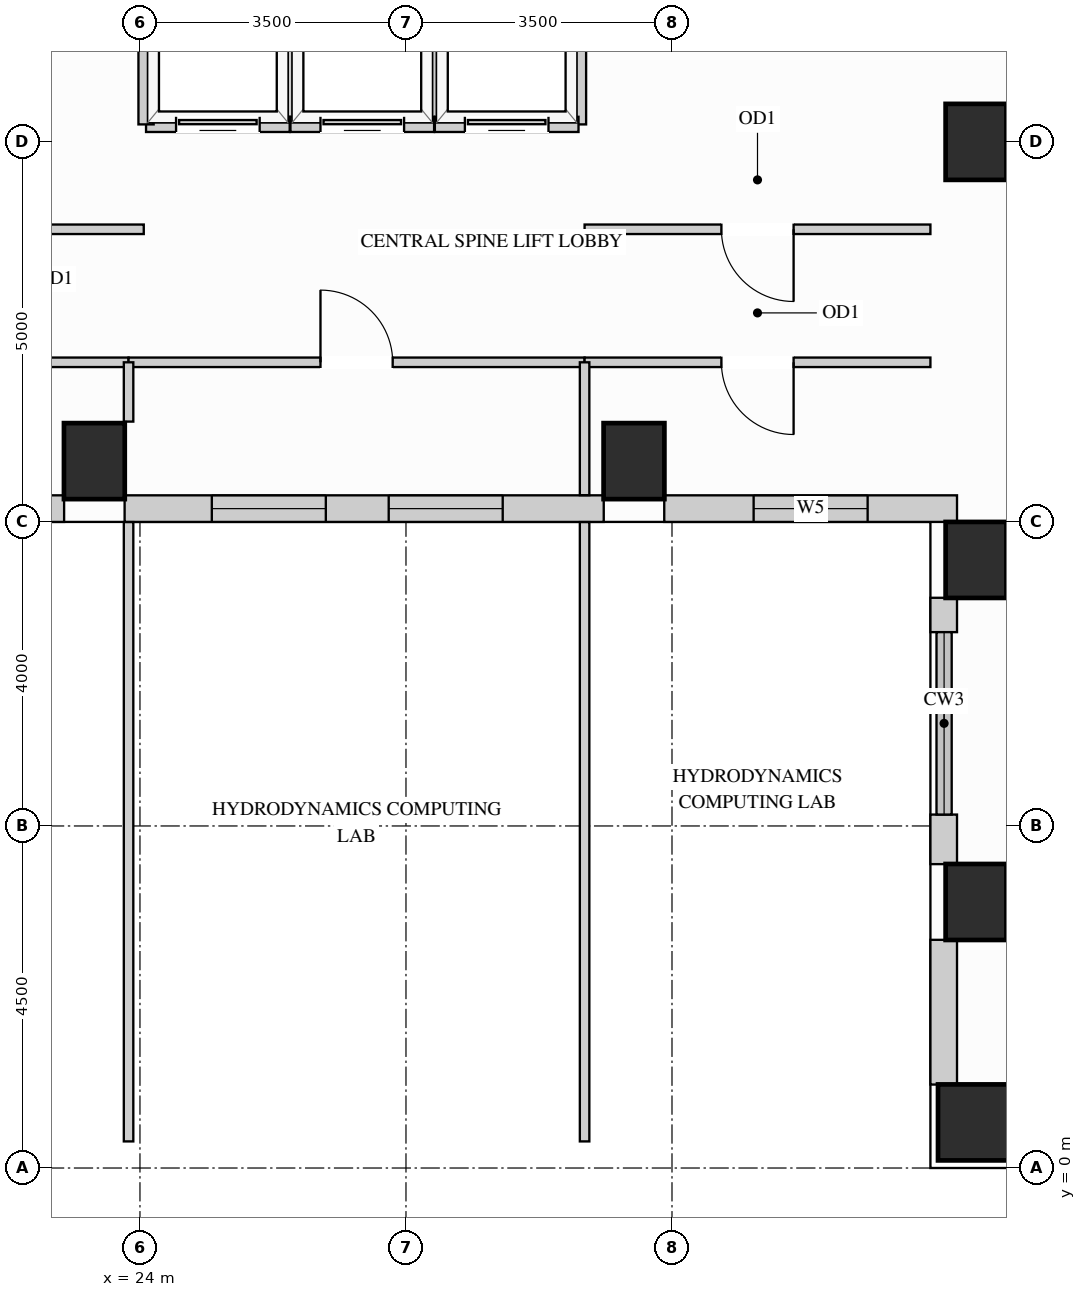
"""IFC4 building model, lengths in metres.
Left out: names, types, materials, properties, quantities, classifications, styles, units other than length and angle.
Written with IfcOpenShell. Run it as: python <this file> out.ifc"""

import sys

from ifc_helpers import new_model, si_unit, direction, frame, frame_2d, origin, origin_2d, place, context, subcontext, project, spatial, rectangle, extrude, source, transform, mapped, element, fill, save


model = new_model("IFC4")
c1 = context("Model", 3, precision=1e-05, world=origin(), true_north=direction((0.0, 1.0)))
c2 = subcontext(c1, "Body", "Model", "MODEL_VIEW")
j1 = project(units=[si_unit("LENGTHUNIT", "METRE"), si_unit("PLANEANGLEUNIT", "RADIAN")], contexts=[c1])
p1 = place(None, origin())
s1 = spatial("IfcSite", under=j1, at=p1, CompositionType="ELEMENT")
p2 = place(p1, origin())
s2 = spatial("IfcBuilding", under=s1, at=p2, CompositionType="ELEMENT")
p3 = place(p2, frame((0.0, 0.0, 161.1)))
s3 = spatial("IfcBuildingStorey", under=s2, at=p3, CompositionType="ELEMENT", Elevation=161.1)
m1 = source(origin(), c2, "Body", "SweptSolid", [
    extrude(rectangle(XDim=0.8, YDim=1.0, at=origin_2d()), origin(), (0.0, 0.0, 1.0), 3.4),
])
for number, where, z_axis, x_axis in (
    (1, (35.0, 13.5, 0.0), (0.0, 0.0, 1.0), (1.0, 0.0, 0.0)),
    (2, (35.0, 3.5, 0.0), (0.0, 0.0, 1.0), (1.0, 0.0, 0.0)),
    (3, (35.0, 8.0, 0.0), (0.0, 0.0, 1.0), (1.0, 0.0, 0.0)),
    (4, (23.4, 9.3, 0.0), (0.0, 0.0, 1.0), (1.0, 0.0, 0.0)),
    (5, (30.5, 9.3, 0.0), (0.0, 0.0, 1.0), (1.0, 0.0, 0.0)),
):
    element("IfcColumn", number, at=place(p3, frame(where, z_axis=z_axis, x_axis=x_axis)), inside=s3, PredefinedType="COLUMN", context=c2, shape_type="MappedRepresentation", body=[
        mapped(m1, transform((0.0, 0.0, 0.0), x_axis=(1.0, 0.0, 0.0), y_axis=(0.0, 1.0, 0.0), z_axis=(0.0, 0.0, 1.0))),
    ])
m2 = source(origin(), c2, "Body", "SweptSolid", [
    extrude(rectangle(XDim=1.0, YDim=1.0, at=origin_2d()), origin(), (0.0, 0.0, 1.0), 3.4),
])
p4 = place(p3, frame((35.0, 0.6, 0.0), z_axis=(0.0, 0.0, 1.0), x_axis=(1.0, 0.0, 0.0)))
e6 = element("IfcColumn", 6, at=p4, inside=s3, PredefinedType="COLUMN", context=c2, shape_type="MappedRepresentation", body=[
    mapped(m2, transform((0.0, 0.0, 0.0), x_axis=(1.0, 0.0, 0.0), y_axis=(0.0, 1.0, 0.0), z_axis=(0.0, 0.0, 1.0))),
])
p5 = place(p3, frame((19.398, 8.675, 0.0), z_axis=(0.0, 0.0, 1.0), x_axis=(1.0, 0.0, 0.0)))
e7 = element("IfcWall", 7, at=p5, inside=s3, PredefinedType="SOLIDWALL", context=c2, shape_type="SweptSolid", body=[
    extrude(rectangle(XDim=3.604, YDim=0.35, at=frame_2d((1.802, 0.0))), origin(), (0.0, 0.0, 1.0), 3.385),
])
p6 = place(p5, frame((1.067, 0.0, 0.78)))
e8 = element("IfcOpeningElement", 8, at=p6, cuts=e7, PredefinedType="OPENING", context=c2, shape_type="SweptSolid", body=[
    extrude(rectangle(XDim=1.5, YDim=2.0, at=frame_2d((0.75, 1.0))), frame((0.0, 0.185, 0.0), z_axis=(0.0, -1.0, 0.0), x_axis=(1.0, 0.0, 0.0)), (0.0, 0.0, 1.0), 0.37),
])
p7 = place(p3, frame((23.798, 8.675, 0.0), z_axis=(0.0, 0.0, 1.0), x_axis=(1.0, 0.0, 0.0)))
e9 = element("IfcWall", 9, at=p7, inside=s3, PredefinedType="SOLIDWALL", context=c2, shape_type="SweptSolid", body=[
    extrude(rectangle(XDim=6.304, YDim=0.35, at=frame_2d((3.152, 0.0))), origin(), (0.0, 0.0, 1.0), 3.385),
])
p8 = place(p7, frame((1.147, 0.0, 0.78)))
e10 = element("IfcOpeningElement", 10, at=p8, cuts=e9, PredefinedType="OPENING", context=c2, shape_type="SweptSolid", body=[
    extrude(rectangle(XDim=1.5, YDim=2.0, at=frame_2d((0.75, 1.0))), frame((0.0, 0.185, 0.0), z_axis=(0.0, -1.0, 0.0), x_axis=(1.0, 0.0, 0.0)), (0.0, 0.0, 1.0), 0.37),
])
p9 = place(p7, frame((3.475, 0.0, 0.78)))
e11 = element("IfcOpeningElement", 11, at=p9, cuts=e9, PredefinedType="OPENING", context=c2, shape_type="SweptSolid", body=[
    extrude(rectangle(XDim=1.5, YDim=2.0, at=frame_2d((0.75, 1.0))), frame((0.0, 0.185, 0.0), z_axis=(0.0, -1.0, 0.0), x_axis=(1.0, 0.0, 0.0)), (0.0, 0.0, 1.0), 0.37),
])
p10 = place(p3, frame((30.898, 8.675, 0.0), z_axis=(0.0, 0.0, 1.0), x_axis=(1.0, 0.0, 0.0)))
e12 = element("IfcWall", 12, at=p10, inside=s3, PredefinedType="SOLIDWALL", context=c2, shape_type="SweptSolid", body=[
    extrude(rectangle(XDim=3.852, YDim=0.35, at=frame_2d((1.926, 0.0))), origin(), (0.0, 0.0, 1.0), 3.385),
])
p11 = place(p10, frame((1.176, 0.0, 0.78)))
e13 = element("IfcOpeningElement", 13, at=p11, cuts=e12, PredefinedType="OPENING", context=c2, shape_type="SweptSolid", body=[
    extrude(rectangle(XDim=1.5, YDim=2.0, at=frame_2d((0.75, 1.0))), frame((0.0, 0.185, 0.0), z_axis=(0.0, -1.0, 0.0), x_axis=(1.0, 0.0, 0.0)), (0.0, 0.0, 1.0), 0.37),
])
m3 = source(origin(), c2, "Body", "SweptSolid", [
    extrude(rectangle(XDim=0.452, YDim=0.35, at=frame_2d((0.226, 0.0))), origin(), (0.0, 0.0, 1.0), 2.612),
])
p12 = place(p3, frame((34.575, 7.502, 0.0), z_axis=(0.0, 0.0, 1.0), x_axis=(0.0, -1.0, 0.0)))
e14 = element("IfcWall", 14, at=p12, inside=s3, PredefinedType="SOLIDWALL", context=c2, shape_type="MappedRepresentation", body=[
    mapped(m3, transform((0.0, 0.0, 0.0), x_axis=(1.0, 0.0, 0.0), y_axis=(0.0, 1.0, 0.0), z_axis=(0.0, 0.0, 1.0))),
])
m4 = source(origin(), c2, "Body", "SweptSolid", [
    extrude(rectangle(XDim=0.652, YDim=0.35, at=frame_2d((0.326, 0.0))), origin(), (0.0, 0.0, 1.0), 2.612),
])
p13 = place(p3, frame((34.575, 4.65, 0.0), z_axis=(0.0, 0.0, 1.0), x_axis=(0.0, -1.0, 0.0)))
e15 = element("IfcWall", 15, at=p13, inside=s3, PredefinedType="SOLIDWALL", context=c2, shape_type="MappedRepresentation", body=[
    mapped(m4, transform((0.0, 0.0, 0.0), x_axis=(1.0, 0.0, 0.0), y_axis=(0.0, 1.0, 0.0), z_axis=(0.0, 0.0, 1.0))),
])
m5 = source(origin(), c2, "Body", "SweptSolid", [
    extrude(rectangle(XDim=1.904, YDim=0.35, at=frame_2d((0.952, 0.0))), origin(), (0.0, 0.0, 1.0), 2.612),
])
p14 = place(p3, frame((34.575, 3.002, 0.0), z_axis=(0.0, 0.0, 1.0), x_axis=(0.0, -1.0, 0.0)))
e16 = element("IfcWall", 16, at=p14, inside=s3, PredefinedType="SOLIDWALL", context=c2, shape_type="MappedRepresentation", body=[
    mapped(m5, transform((0.0, 0.0, 0.0), x_axis=(1.0, 0.0, 0.0), y_axis=(0.0, 1.0, 0.0), z_axis=(0.0, 0.0, 1.0))),
])
p15 = place(p3, frame((29.85, 12.35, 0.0), z_axis=(0.0, 0.0, 1.0), x_axis=(1.0, 0.0, 0.0)))
e17 = element("IfcWall", 17, at=p15, inside=s3, PredefinedType="PARTITIONING", context=c2, shape_type="SweptSolid", body=[
    extrude(rectangle(XDim=4.55, YDim=0.125, at=frame_2d((2.275, 0.0))), origin(), (0.0, 0.0, 1.0), 3.385),
])
p16 = place(p15, frame((1.8, 0.0, 0.0)))
e18 = element("IfcOpeningElement", 18, at=p16, cuts=e17, PredefinedType="OPENING", context=c2, shape_type="SweptSolid", body=[
    extrude(rectangle(XDim=0.95, YDim=2.15, at=frame_2d((0.475, 1.075))), frame((0.0, 0.073, 0.0), z_axis=(0.0, -1.0, 0.0), x_axis=(1.0, 0.0, 0.0)), (0.0, 0.0, 1.0), 0.145),
])
p17 = place(p3, frame((19.5, 12.35, 0.0), z_axis=(0.0, 0.0, 1.0), x_axis=(1.0, 0.0, 0.0)))
e19 = element("IfcWall", 19, at=p17, inside=s3, PredefinedType="PARTITIONING", context=c2, shape_type="SweptSolid", body=[
    extrude(rectangle(XDim=4.55, YDim=0.125, at=frame_2d((2.275, 0.0))), origin(), (0.0, 0.0, 1.0), 3.385),
])
p18 = place(p17, frame((1.8, 0.0, 0.0)))
e20 = element("IfcOpeningElement", 20, at=p18, cuts=e19, PredefinedType="OPENING", context=c2, shape_type="SweptSolid", body=[
    extrude(rectangle(XDim=0.95, YDim=2.15, at=frame_2d((0.475, 1.075))), frame((0.0, 0.073, 0.0), z_axis=(0.0, -1.0, 0.0), x_axis=(1.0, 0.0, 0.0)), (0.0, 0.0, 1.0), 0.145),
])
p19 = place(p3, frame((19.5, 10.6, 0.0), z_axis=(0.0, 0.0, 1.0), x_axis=(1.0, 0.0, 0.0)))
e21 = element("IfcWall", 21, at=p19, inside=s3, PredefinedType="PARTITIONING", context=c2, shape_type="SweptSolid", body=[
    extrude(rectangle(XDim=4.35, YDim=0.125, at=frame_2d((2.175, 0.0))), origin(), (0.0, 0.0, 1.0), 3.385),
])
p20 = place(p19, frame((1.7, 0.0, 0.0)))
e22 = element("IfcOpeningElement", 22, at=p20, cuts=e21, PredefinedType="OPENING", context=c2, shape_type="SweptSolid", body=[
    extrude(rectangle(XDim=0.95, YDim=2.15, at=frame_2d((0.475, 1.075))), frame((0.0, 0.073, 0.0), z_axis=(0.0, -1.0, 0.0), x_axis=(1.0, 0.0, 0.0)), (0.0, 0.0, 1.0), 0.145),
])
p21 = place(p3, frame((23.85, 10.6, 0.0), z_axis=(0.0, 0.0, 1.0), x_axis=(1.0, 0.0, 0.0)))
e23 = element("IfcWall", 23, at=p21, inside=s3, PredefinedType="PARTITIONING", context=c2, shape_type="SweptSolid", body=[
    extrude(rectangle(XDim=6.0, YDim=0.125, at=frame_2d((3.0, 0.0))), origin(), (0.0, 0.0, 1.0), 3.385),
])
p22 = place(p21, frame((2.525, 0.0, 0.0)))
e24 = element("IfcOpeningElement", 24, at=p22, cuts=e23, PredefinedType="OPENING", context=c2, shape_type="SweptSolid", body=[
    extrude(rectangle(XDim=0.95, YDim=2.15, at=frame_2d((0.475, 1.075))), frame((0.0, 0.073, 0.0), z_axis=(0.0, -1.0, 0.0), x_axis=(1.0, 0.0, 0.0)), (0.0, 0.0, 1.0), 0.145),
])
p23 = place(p3, frame((29.85, 10.6, 0.0), z_axis=(0.0, 0.0, 1.0), x_axis=(1.0, 0.0, 0.0)))
e25 = element("IfcWall", 25, at=p23, inside=s3, PredefinedType="PARTITIONING", context=c2, shape_type="SweptSolid", body=[
    extrude(rectangle(XDim=4.55, YDim=0.125, at=frame_2d((2.275, 0.0))), origin(), (0.0, 0.0, 1.0), 3.385),
])
p24 = place(p23, frame((1.8, 0.0, 0.0)))
e26 = element("IfcOpeningElement", 26, at=p24, cuts=e25, PredefinedType="OPENING", context=c2, shape_type="SweptSolid", body=[
    extrude(rectangle(XDim=0.95, YDim=2.15, at=frame_2d((0.475, 1.075))), frame((0.0, 0.073, 0.0), z_axis=(0.0, -1.0, 0.0), x_axis=(1.0, 0.0, 0.0)), (0.0, 0.0, 1.0), 0.145),
])
m6 = source(origin(), c2, "Body", "SweptSolid", [
    extrude(rectangle(XDim=8.148, YDim=0.125, at=frame_2d((4.074, 0.0))), origin(), (0.0, 0.0, 1.0), 3.385),
])
p25 = place(p3, frame((23.85, 0.35, 0.0), z_axis=(0.0, 0.0, 1.0), x_axis=(0.0, 1.0, 0.0)))
e27 = element("IfcWall", 27, at=p25, inside=s3, PredefinedType="PARTITIONING", context=c2, shape_type="MappedRepresentation", body=[
    mapped(m6, transform((0.0, 0.0, 0.0), x_axis=(1.0, 0.0, 0.0), y_axis=(0.0, 1.0, 0.0), z_axis=(0.0, 0.0, 1.0))),
])
m7 = source(origin(), c2, "Body", "SweptSolid", [
    extrude(rectangle(XDim=0.78, YDim=0.125, at=frame_2d((0.39, 0.0))), origin(), (0.0, 0.0, 1.0), 3.385),
])
p26 = place(p3, frame((23.85, 9.82, 0.0), z_axis=(0.0, 0.0, 1.0), x_axis=(0.0, 1.0, 0.0)))
e28 = element("IfcWall", 28, at=p26, inside=s3, PredefinedType="PARTITIONING", context=c2, shape_type="MappedRepresentation", body=[
    mapped(m7, transform((0.0, 0.0, 0.0), x_axis=(1.0, 0.0, 0.0), y_axis=(0.0, 1.0, 0.0), z_axis=(0.0, 0.0, 1.0))),
])
p27 = place(p3, frame((29.85, 0.35, 0.0), z_axis=(0.0, 0.0, 1.0), x_axis=(0.0, 1.0, 0.0)))
e29 = element("IfcWall", 29, at=p27, inside=s3, PredefinedType="PARTITIONING", context=c2, shape_type="MappedRepresentation", body=[
    mapped(m6, transform((0.0, 0.0, 0.0), x_axis=(1.0, 0.0, 0.0), y_axis=(0.0, 1.0, 0.0), z_axis=(0.0, 0.0, 1.0))),
])
m8 = source(origin(), c2, "Body", "SweptSolid", [
    extrude(rectangle(XDim=1.748, YDim=0.125, at=frame_2d((0.874, 0.0))), origin(), (0.0, 0.0, 1.0), 3.385),
])
p28 = place(p3, frame((29.85, 8.852, 0.0), z_axis=(0.0, 0.0, 1.0), x_axis=(0.0, 1.0, 0.0)))
e30 = element("IfcWall", 30, at=p28, inside=s3, PredefinedType="PARTITIONING", context=c2, shape_type="MappedRepresentation", body=[
    mapped(m8, transform((0.0, 0.0, 0.0), x_axis=(1.0, 0.0, 0.0), y_axis=(0.0, 1.0, 0.0), z_axis=(0.0, 0.0, 1.0))),
])
m9 = source(origin(), c2, "Body", "SweptSolid", [
    extrude(rectangle(XDim=2.29, YDim=0.2, at=frame_2d((1.145, 0.0))), origin(), (0.0, 0.0, 1.0), 3.385),
])
p29 = place(p3, frame((25.97, 13.73, 0.0), z_axis=(0.0, 0.0, 1.0), x_axis=(0.0, 1.0, 0.0)))
e31 = element("IfcWall", 31, at=p29, inside=s3, PredefinedType="PARTITIONING", context=c2, shape_type="MappedRepresentation", body=[
    mapped(m9, transform((0.0, 0.0, 0.0), x_axis=(1.0, 0.0, 0.0), y_axis=(0.0, 1.0, 0.0), z_axis=(0.0, 0.0, 1.0))),
])
p30 = place(p3, frame((24.08, 13.73, 0.0), z_axis=(0.0, 0.0, 1.0), x_axis=(1.0, 0.0, 0.0)))
e32 = element("IfcWall", 32, at=p30, inside=s3, PredefinedType="PARTITIONING", context=c2, shape_type="SweptSolid", body=[
    extrude(rectangle(XDim=1.89, YDim=0.2, at=frame_2d((0.945, 0.0))), origin(), (0.0, 0.0, 1.0), 2.466),
])
p31 = place(p30, frame((0.395, 0.0, 0.0)))
e33 = element("IfcOpeningElement", 33, at=p31, cuts=e32, PredefinedType="OPENING", context=c2, shape_type="SweptSolid", body=[
    extrude(rectangle(XDim=1.1, YDim=2.2, at=frame_2d((0.55, 1.1))), frame((0.0, 0.11, 0.0), z_axis=(0.0, -1.0, 0.0), x_axis=(1.0, 0.0, 0.0)), (0.0, 0.0, 1.0), 0.22),
])
for number, where, z_axis, x_axis in (
    (34, (24.08, 13.73, 0.0), (0.0, 0.0, 1.0), (0.0, 1.0, 0.0)),
    (35, (27.87, 13.73, 0.0), (0.0, 0.0, 1.0), (0.0, 1.0, 0.0)),
):
    element("IfcWall", number, at=place(p3, frame(where, z_axis=z_axis, x_axis=x_axis)), inside=s3, PredefinedType="PARTITIONING", context=c2, shape_type="MappedRepresentation", body=[
        mapped(m9, transform((0.0, 0.0, 0.0), x_axis=(1.0, 0.0, 0.0), y_axis=(0.0, 1.0, 0.0), z_axis=(0.0, 0.0, 1.0))),
    ])
p32 = place(p3, frame((25.98, 13.73, 0.0), z_axis=(0.0, 0.0, 1.0), x_axis=(1.0, 0.0, 0.0)))
e36 = element("IfcWall", 36, at=p32, inside=s3, PredefinedType="PARTITIONING", context=c2, shape_type="SweptSolid", body=[
    extrude(rectangle(XDim=1.89, YDim=0.2, at=frame_2d((0.945, 0.0))), origin(), (0.0, 0.0, 1.0), 2.466),
])
p33 = place(p32, frame((0.395, 0.0, 0.0)))
e37 = element("IfcOpeningElement", 37, at=p33, cuts=e36, PredefinedType="OPENING", context=c2, shape_type="SweptSolid", body=[
    extrude(rectangle(XDim=1.1, YDim=2.2, at=frame_2d((0.55, 1.1))), frame((0.0, 0.11, 0.0), z_axis=(0.0, -1.0, 0.0), x_axis=(1.0, 0.0, 0.0)), (0.0, 0.0, 1.0), 0.22),
])
p34 = place(p3, frame((29.77, 13.73, 0.0), z_axis=(0.0, 0.0, 1.0), x_axis=(0.0, 1.0, 0.0)))
e38 = element("IfcWall", 38, at=p34, inside=s3, PredefinedType="PARTITIONING", context=c2, shape_type="MappedRepresentation", body=[
    mapped(m9, transform((0.0, 0.0, 0.0), x_axis=(1.0, 0.0, 0.0), y_axis=(0.0, 1.0, 0.0), z_axis=(0.0, 0.0, 1.0))),
])
p35 = place(p3, frame((27.88, 13.73, 0.0), z_axis=(0.0, 0.0, 1.0), x_axis=(1.0, 0.0, 0.0)))
e39 = element("IfcWall", 39, at=p35, inside=s3, PredefinedType="PARTITIONING", context=c2, shape_type="SweptSolid", body=[
    extrude(rectangle(XDim=1.89, YDim=0.2, at=frame_2d((0.945, 0.0))), origin(), (0.0, 0.0, 1.0), 2.466),
])
p36 = place(p35, frame((0.395, 0.0, 0.0)))
e40 = element("IfcOpeningElement", 40, at=p36, cuts=e39, PredefinedType="OPENING", context=c2, shape_type="SweptSolid", body=[
    extrude(rectangle(XDim=1.1, YDim=2.2, at=frame_2d((0.55, 1.1))), frame((0.0, 0.11, 0.0), z_axis=(0.0, -1.0, 0.0), x_axis=(1.0, 0.0, 0.0)), (0.0, 0.0, 1.0), 0.22),
])
m10 = source(origin(), c2, "Body", "SweptSolid", [
    extrude(rectangle(XDim=1.1, YDim=2.2, at=frame_2d((0.55, 1.1))), frame((0.0, 0.025, 0.0), z_axis=(0.0, -1.0, 0.0), x_axis=(1.0, 0.0, 0.0)), (0.0, 0.0, 1.0), 0.05),
])
p37 = place(p31, origin())
e41 = element("IfcDoor", 41, at=p37, inside=s3, OperationType="SLIDING_TO_LEFT", PredefinedType="DOOR", context=c2, shape_type="MappedRepresentation", body=[
    mapped(m10, transform((0.0, 0.0, 0.0), x_axis=(1.0, 0.0, 0.0), y_axis=(0.0, 1.0, 0.0), z_axis=(0.0, 0.0, 1.0))),
])
fill(e33, e41)
p38 = place(p33, origin())
e42 = element("IfcDoor", 42, at=p38, inside=s3, OperationType="SLIDING_TO_LEFT", PredefinedType="DOOR", context=c2, shape_type="MappedRepresentation", body=[
    mapped(m10, transform((0.0, 0.0, 0.0), x_axis=(1.0, 0.0, 0.0), y_axis=(0.0, 1.0, 0.0), z_axis=(0.0, 0.0, 1.0))),
])
fill(e37, e42)
p39 = place(p36, origin())
e43 = element("IfcDoor", 43, at=p39, inside=s3, OperationType="SLIDING_TO_LEFT", PredefinedType="DOOR", context=c2, shape_type="MappedRepresentation", body=[
    mapped(m10, transform((0.0, 0.0, 0.0), x_axis=(1.0, 0.0, 0.0), y_axis=(0.0, 1.0, 0.0), z_axis=(0.0, 0.0, 1.0))),
])
fill(e40, e43)
m11 = source(origin(), c2, "Body", "SweptSolid", [
    extrude(rectangle(XDim=0.95, YDim=2.15, at=frame_2d((0.475, 1.075))), frame((0.0, 0.025, 0.0), z_axis=(0.0, -1.0, 0.0), x_axis=(1.0, 0.0, 0.0)), (0.0, 0.0, 1.0), 0.05),
])
p40 = place(p16, origin())
e44 = element("IfcDoor", 44, at=p40, inside=s3, OperationType="SINGLE_SWING_RIGHT", PredefinedType="DOOR", context=c2, shape_type="MappedRepresentation", body=[
    mapped(m11, transform((0.0, 0.0, 0.0), x_axis=(1.0, 0.0, 0.0), y_axis=(0.0, 1.0, 0.0), z_axis=(0.0, 0.0, 1.0))),
])
fill(e18, e44)
p41 = place(p22, origin())
e45 = element("IfcDoor", 45, at=p41, inside=s3, OperationType="SINGLE_SWING_LEFT", PredefinedType="DOOR", context=c2, shape_type="MappedRepresentation", body=[
    mapped(m11, transform((0.0, 0.0, 0.0), x_axis=(1.0, 0.0, 0.0), y_axis=(0.0, 1.0, 0.0), z_axis=(0.0, 0.0, 1.0))),
])
fill(e24, e45)
p42 = place(p24, origin())
e46 = element("IfcDoor", 46, at=p42, inside=s3, OperationType="SINGLE_SWING_RIGHT", PredefinedType="DOOR", context=c2, shape_type="MappedRepresentation", body=[
    mapped(m11, transform((0.0, 0.0, 0.0), x_axis=(1.0, 0.0, 0.0), y_axis=(0.0, 1.0, 0.0), z_axis=(0.0, 0.0, 1.0))),
])
fill(e26, e46)
m12 = source(origin(), c2, "Body", "SweptSolid", [
    extrude(rectangle(XDim=1.5, YDim=2.0, at=frame_2d((0.75, 1.0))), frame((0.0, 0.03, 0.0), z_axis=(0.0, -1.0, 0.0), x_axis=(1.0, 0.0, 0.0)), (0.0, 0.0, 1.0), 0.06),
])
p43 = place(p8, origin())
e47 = element("IfcWindow", 47, at=p43, inside=s3, PartitioningType="SINGLE_PANEL", PredefinedType="WINDOW", context=c2, shape_type="MappedRepresentation", body=[
    mapped(m12, transform((0.0, 0.0, 0.0), x_axis=(1.0, 0.0, 0.0), y_axis=(0.0, 1.0, 0.0), z_axis=(0.0, 0.0, 1.0))),
])
fill(e10, e47)
p44 = place(p9, origin())
e48 = element("IfcWindow", 48, at=p44, inside=s3, PartitioningType="SINGLE_PANEL", PredefinedType="WINDOW", context=c2, shape_type="MappedRepresentation", body=[
    mapped(m12, transform((0.0, 0.0, 0.0), x_axis=(1.0, 0.0, 0.0), y_axis=(0.0, 1.0, 0.0), z_axis=(0.0, 0.0, 1.0))),
])
fill(e11, e48)
p45 = place(p11, origin())
e49 = element("IfcWindow", 49, at=p45, inside=s3, PartitioningType="SINGLE_PANEL", PredefinedType="WINDOW", context=c2, shape_type="MappedRepresentation", body=[
    mapped(m12, transform((0.0, 0.0, 0.0), x_axis=(1.0, 0.0, 0.0), y_axis=(0.0, 1.0, 0.0), z_axis=(0.0, 0.0, 1.0))),
])
fill(e13, e49)
save(model, sys.argv[1])
